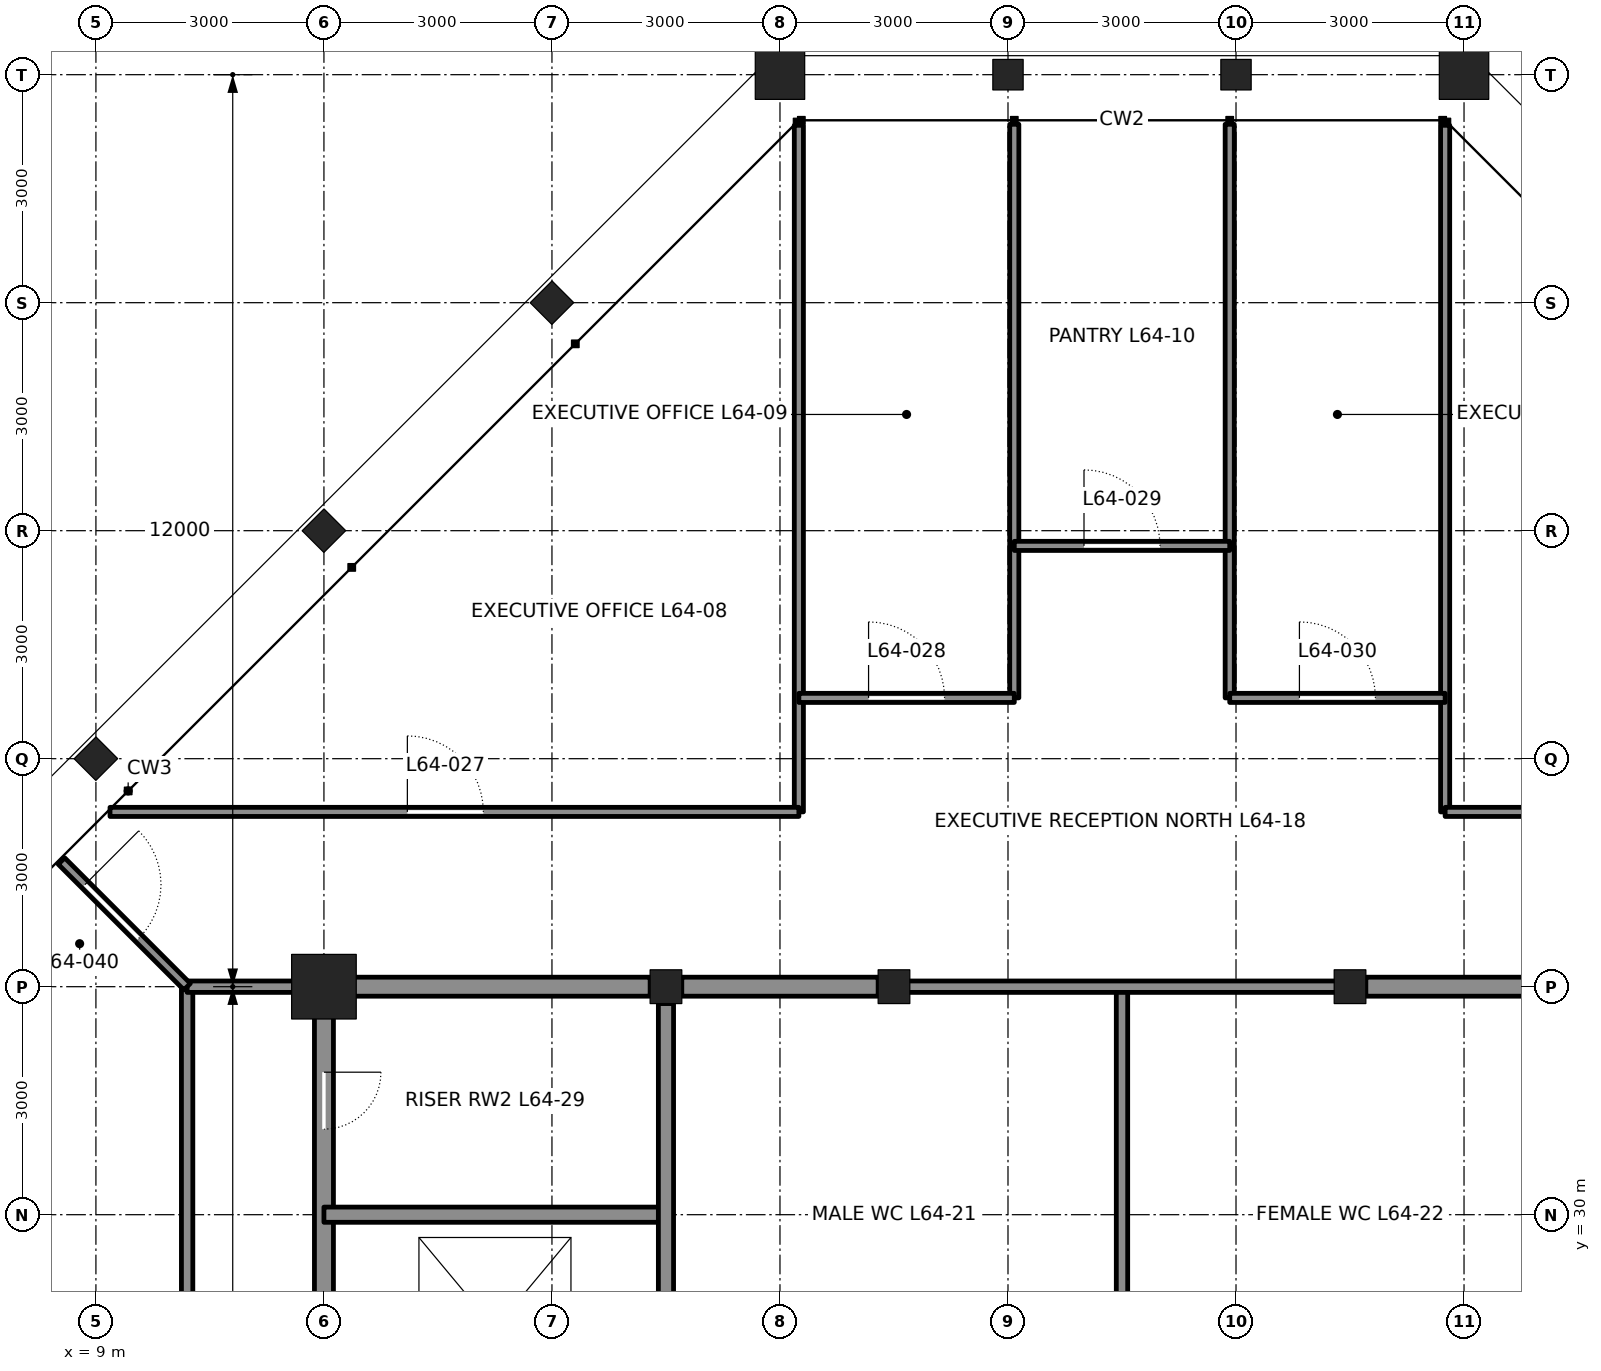
"""IFC4 building model, lengths in metres.
Left out: names, types, materials, properties, quantities, classifications, styles, units other than length and angle.
Written with IfcOpenShell. Run it as: python <this file> out.ifc"""

import sys

from ifc_helpers import new_model, si_unit, direction, frame, frame_2d, origin, origin_2d, place, context, subcontext, project, spatial, rectangle, hollow_rectangle, i_section, extrude, element, fill, save


model = new_model("IFC4")
c1 = context("Model", 3, precision=1e-05, world=origin(), true_north=direction((0.0, 1.0)))
c2 = subcontext(c1, "Body", "Model", "MODEL_VIEW")
j1 = project(units=[si_unit("LENGTHUNIT", "METRE"), si_unit("PLANEANGLEUNIT", "RADIAN")], contexts=[c1])
p1 = place(None, origin())
s1 = spatial("IfcSite", under=j1, at=p1, CompositionType="ELEMENT")
p2 = place(p1, origin())
s2 = spatial("IfcBuilding", under=s1, at=p2, CompositionType="ELEMENT")
p3 = place(p2, frame((0.0, 0.0, 287.4)))
s3 = spatial("IfcBuildingStorey", under=s2, at=p3, CompositionType="ELEMENT", Elevation=287.4)
p4 = place(p3, frame((27.0, 45.0, 0.0), z_axis=(0.0, 0.0, 1.0), x_axis=(0.0, 1.0, 0.0)))
e1 = element("IfcColumn", 1, at=p4, inside=s3, PredefinedType="COLUMN", context=c2, shape_type="SweptSolid", body=[
    extrude(hollow_rectangle(XDim=0.65, YDim=0.65, WallThickness=0.065, at=origin_2d()), origin(), (0.0, 0.0, 1.0), 4.2),
])
for number, where, z_axis, x_axis in (
    (2, (24.0, 45.0, 0.0), (0.0, 0.0, 1.0), (0.0, 1.0, 0.0)),
    (3, (21.0, 45.0, 0.0), (0.0, 0.0, 1.0), (0.0, 1.0, 0.0)),
):
    element("IfcColumn", number, at=place(p3, frame(where, z_axis=z_axis, x_axis=x_axis)), inside=s3, PredefinedType="COLUMN", context=c2, shape_type="SweptSolid", body=[
        extrude(i_section(OverallWidth=0.401, OverallDepth=0.399, WebThickness=0.025, FlangeThickness=0.04, at=origin_2d()), origin(), (0.0, 0.0, 1.0), 4.2),
    ])
p5 = place(p3, frame((18.0, 45.0, 0.0), z_axis=(0.0, 0.0, 1.0), x_axis=(0.0, 1.0, 0.0)))
e4 = element("IfcColumn", 4, at=p5, inside=s3, PredefinedType="COLUMN", context=c2, shape_type="SweptSolid", body=[
    extrude(hollow_rectangle(XDim=0.65, YDim=0.65, WallThickness=0.065, at=origin_2d()), origin(), (0.0, 0.0, 1.0), 4.2),
])
for number, where, z_axis, x_axis in (
    (5, (15.0, 42.0, 0.0), (0.0, 0.0, 1.0), (-0.707, 0.707, 0.0)),
    (6, (12.0, 39.0, 0.0), (0.0, 0.0, 1.0), (-0.707, 0.707, 0.0)),
    (7, (9.0, 36.0, 0.0), (0.0, 0.0, 1.0), (-0.707, 0.707, 0.0)),
):
    element("IfcColumn", number, at=place(p3, frame(where, z_axis=z_axis, x_axis=x_axis)), inside=s3, PredefinedType="COLUMN", context=c2, shape_type="SweptSolid", body=[
        extrude(i_section(OverallWidth=0.404, OverallDepth=0.406, WebThickness=0.027, FlangeThickness=0.044, at=origin_2d()), origin(), (0.0, 0.0, 1.0), 4.2),
    ])
p6 = place(p3, frame((12.0, 33.0, 0.0), z_axis=(0.0, 0.0, 1.0), x_axis=(1.0, 0.0, 0.0)))
e8 = element("IfcColumn", 8, at=p6, inside=s3, PredefinedType="COLUMN", context=c2, shape_type="SweptSolid", body=[
    extrude(hollow_rectangle(XDim=0.85, YDim=0.85, WallThickness=0.085, at=origin_2d()), origin(), (0.0, 0.0, 1.0), 4.2),
])
for number, where, z_axis, x_axis in (
    (9, (16.5, 33.0, 0.0), (0.0, 0.0, 1.0), (1.0, 0.0, 0.0)),
    (10, (19.5, 33.0, 0.0), (0.0, 0.0, 1.0), (1.0, 0.0, 0.0)),
    (11, (25.5, 33.0, 0.0), (0.0, 0.0, 1.0), (1.0, 0.0, 0.0)),
):
    element("IfcColumn", number, at=place(p3, frame(where, z_axis=z_axis, x_axis=x_axis)), inside=s3, PredefinedType="COLUMN", context=c2, shape_type="SweptSolid", body=[
        extrude(i_section(OverallWidth=0.417, OverallDepth=0.445, WebThickness=0.039, FlangeThickness=0.063, at=origin_2d()), origin(), (0.0, 0.0, 1.0), 4.2),
    ])
p7 = place(p3, frame((12.0, 24.222, 0.0), z_axis=(0.0, 0.0, 1.0), x_axis=(0.0, 1.0, 0.0)))
e12 = element("IfcWall", 12, at=p7, inside=s3, PredefinedType="SOLIDWALL", context=c2, shape_type="SweptSolid", body=[
    extrude(rectangle(XDim=8.528, YDim=0.25, at=frame_2d((4.264, 0.0))), origin(), (0.0, 0.0, 1.0), 3.113),
])
p8 = place(p7, frame((0.678, 0.0, 0.0)))
e13 = element("IfcOpeningElement", 13, at=p8, cuts=e12, PredefinedType="OPENING", context=c2, shape_type="SweptSolid", body=[
    extrude(rectangle(XDim=1.2, YDim=2.1, at=frame_2d((0.6, 1.05))), frame((0.0, 0.135, 0.0), z_axis=(0.0, -1.0, 0.0), x_axis=(1.0, 0.0, 0.0)), (0.0, 0.0, 1.0), 0.27),
])
p9 = place(p7, frame((6.903, 0.0, 0.0)))
e14 = element("IfcOpeningElement", 14, at=p9, cuts=e12, PredefinedType="OPENING", context=c2, shape_type="SweptSolid", body=[
    extrude(rectangle(XDim=0.75, YDim=2.1, at=frame_2d((0.375, 1.05))), frame((0.0, 0.135, 0.0), z_axis=(0.0, -1.0, 0.0), x_axis=(1.0, 0.0, 0.0)), (0.0, 0.0, 1.0), 0.27),
])
p10 = place(p3, frame((12.0, 30.0, 0.0), z_axis=(0.0, 0.0, 1.0), x_axis=(1.0, 0.0, 0.0)))
e15 = element("IfcWall", 15, at=p10, inside=s3, PredefinedType="SOLIDWALL", context=c2, shape_type="SweptSolid", body=[
    extrude(rectangle(XDim=4.5, YDim=0.2, at=frame_2d((2.25, 0.0))), origin(), (0.0, 0.0, 1.0), 4.04),
])
p11 = place(p3, frame((12.25, 33.0, 0.0), z_axis=(0.0, 0.0, 1.0), x_axis=(1.0, 0.0, 0.0)))
e16 = element("IfcWall", 16, at=p11, inside=s3, PredefinedType="SOLIDWALL", context=c2, shape_type="SweptSolid", body=[
    extrude(rectangle(XDim=4.042, YDim=0.25, at=frame_2d((2.021, 0.0))), origin(), (0.0, 0.0, 1.0), 3.182),
])
for number, where, z_axis, x_axis in (
    (17, (16.708, 33.0, 0.0), (0.0, 0.0, 1.0), (1.0, 0.0, 0.0)),
    (18, (25.708, 33.0, 0.0), (0.0, 0.0, 1.0), (1.0, 0.0, 0.0)),
):
    element("IfcWall", number, at=place(p3, frame(where, z_axis=z_axis, x_axis=x_axis)), inside=s3, PredefinedType="SOLIDWALL", context=c2, shape_type="SweptSolid", body=[
        extrude(rectangle(XDim=2.583, YDim=0.25, at=frame_2d((1.292, 0.0))), origin(), (0.0, 0.0, 1.0), 3.182),
    ])
p12 = place(p3, frame((16.5, 24.222, 0.0), z_axis=(0.0, 0.0, 1.0), x_axis=(0.0, 1.0, 0.0)))
e19 = element("IfcWall", 19, at=p12, inside=s3, PredefinedType="SOLIDWALL", context=c2, shape_type="SweptSolid", body=[
    extrude(rectangle(XDim=8.555, YDim=0.2, at=frame_2d((4.278, 0.0))), origin(), (0.0, 0.0, 1.0), 3.113),
])
p13 = place(p3, frame((22.5, 27.0, 0.0), z_axis=(0.0, 0.0, 1.0), x_axis=(0.0, 1.0, 0.0)))
e20 = element("IfcWall", 20, at=p13, inside=s3, PredefinedType="PARTITIONING", context=c2, shape_type="SweptSolid", body=[
    extrude(rectangle(XDim=6.0, YDim=0.15, at=frame_2d((3.0, 0.0))), origin(), (0.0, 0.0, 1.0), 4.04),
])
p14 = place(p3, frame((19.5, 33.0, 0.0), z_axis=(0.0, 0.0, 1.0), x_axis=(1.0, 0.0, 0.0)))
e21 = element("IfcWall", 21, at=p14, inside=s3, PredefinedType="PARTITIONING", context=c2, shape_type="SweptSolid", body=[
    extrude(rectangle(XDim=6.0, YDim=0.15, at=frame_2d((3.0, 0.0))), origin(), (0.0, 0.0, 1.0), 3.182),
])
p15 = place(p3, frame((18.249, 44.334, 0.0), z_axis=(0.0, 0.0, 1.0), x_axis=(0.0, -1.0, 0.0)))
e22 = element("IfcWall", 22, at=p15, inside=s3, PredefinedType="PARTITIONING", context=c2, shape_type="SweptSolid", body=[
    extrude(rectangle(XDim=9.034, YDim=0.12, at=frame_2d((4.517, 0.0))), origin(), (0.0, 0.0, 1.0), 4.04),
])
for number, where, z_axis, x_axis in (
    (23, (21.083, 44.347, 0.0), (0.0, 0.0, 1.0), (0.0, -1.0, 0.0)),
    (24, (23.917, 44.347, 0.0), (0.0, 0.0, 1.0), (0.0, -1.0, 0.0)),
):
    element("IfcWall", number, at=place(p3, frame(where, z_axis=z_axis, x_axis=x_axis)), inside=s3, PredefinedType="PARTITIONING", context=c2, shape_type="SweptSolid", body=[
        extrude(rectangle(XDim=7.547, YDim=0.12, at=frame_2d((3.774, 0.0))), origin(), (0.0, 0.0, 1.0), 3.357),
    ])
p16 = place(p3, frame((26.751, 44.334, 0.0), z_axis=(0.0, 0.0, 1.0), x_axis=(0.0, -1.0, 0.0)))
e25 = element("IfcWall", 25, at=p16, inside=s3, PredefinedType="PARTITIONING", context=c2, shape_type="SweptSolid", body=[
    extrude(rectangle(XDim=9.034, YDim=0.12, at=frame_2d((4.517, 0.0))), origin(), (0.0, 0.0, 1.0), 4.04),
])
p17 = place(p3, frame((9.186, 35.3, 0.0), z_axis=(0.0, 0.0, 1.0), x_axis=(1.0, 0.0, 0.0)))
e26 = element("IfcWall", 26, at=p17, inside=s3, PredefinedType="PARTITIONING", context=c2, shape_type="SweptSolid", body=[
    extrude(rectangle(XDim=9.063, YDim=0.12, at=frame_2d((4.531, 0.0))), origin(), (0.0, 0.0, 1.0), 4.04),
])
p18 = place(p17, frame((3.912, 0.0, 0.0)))
e27 = element("IfcOpeningElement", 27, at=p18, cuts=e26, PredefinedType="OPENING", context=c2, shape_type="SweptSolid", body=[
    extrude(rectangle(XDim=1.0, YDim=2.4, at=frame_2d((0.5, 1.2))), frame((0.0, 0.07, 0.0), z_axis=(0.0, -1.0, 0.0), x_axis=(1.0, 0.0, 0.0)), (0.0, 0.0, 1.0), 0.14),
])
p19 = place(p3, frame((18.249, 36.8, 0.0), z_axis=(0.0, 0.0, 1.0), x_axis=(1.0, 0.0, 0.0)))
e28 = element("IfcWall", 28, at=p19, inside=s3, PredefinedType="PARTITIONING", context=c2, shape_type="SweptSolid", body=[
    extrude(rectangle(XDim=2.834, YDim=0.12, at=frame_2d((1.417, 0.0))), origin(), (0.0, 0.0, 1.0), 4.04),
])
p20 = place(p19, frame((0.917, 0.0, 0.0)))
e29 = element("IfcOpeningElement", 29, at=p20, cuts=e28, PredefinedType="OPENING", context=c2, shape_type="SweptSolid", body=[
    extrude(rectangle(XDim=1.0, YDim=2.4, at=frame_2d((0.5, 1.2))), frame((0.0, 0.07, 0.0), z_axis=(0.0, -1.0, 0.0), x_axis=(1.0, 0.0, 0.0)), (0.0, 0.0, 1.0), 0.14),
])
p21 = place(p3, frame((21.083, 38.8, 0.0), z_axis=(0.0, 0.0, 1.0), x_axis=(1.0, 0.0, 0.0)))
e30 = element("IfcWall", 30, at=p21, inside=s3, PredefinedType="PARTITIONING", context=c2, shape_type="SweptSolid", body=[
    extrude(rectangle(XDim=2.834, YDim=0.12, at=frame_2d((1.417, 0.0))), origin(), (0.0, 0.0, 1.0), 4.04),
])
p22 = place(p21, frame((0.917, 0.0, 0.0)))
e31 = element("IfcOpeningElement", 31, at=p22, cuts=e30, PredefinedType="OPENING", context=c2, shape_type="SweptSolid", body=[
    extrude(rectangle(XDim=1.0, YDim=2.4, at=frame_2d((0.5, 1.2))), frame((0.0, 0.07, 0.0), z_axis=(0.0, -1.0, 0.0), x_axis=(1.0, 0.0, 0.0)), (0.0, 0.0, 1.0), 0.14),
])
p23 = place(p3, frame((23.917, 36.8, 0.0), z_axis=(0.0, 0.0, 1.0), x_axis=(1.0, 0.0, 0.0)))
e32 = element("IfcWall", 32, at=p23, inside=s3, PredefinedType="PARTITIONING", context=c2, shape_type="SweptSolid", body=[
    extrude(rectangle(XDim=2.834, YDim=0.12, at=frame_2d((1.417, 0.0))), origin(), (0.0, 0.0, 1.0), 4.04),
])
p24 = place(p23, frame((0.917, 0.0, 0.0)))
e33 = element("IfcOpeningElement", 33, at=p24, cuts=e32, PredefinedType="OPENING", context=c2, shape_type="SweptSolid", body=[
    extrude(rectangle(XDim=1.0, YDim=2.4, at=frame_2d((0.5, 1.2))), frame((0.0, 0.07, 0.0), z_axis=(0.0, -1.0, 0.0), x_axis=(1.0, 0.0, 0.0)), (0.0, 0.0, 1.0), 0.14),
])
p25 = place(p3, frame((26.751, 35.3, 0.0), z_axis=(0.0, 0.0, 1.0), x_axis=(1.0, 0.0, 0.0)))
e34 = element("IfcWall", 34, at=p25, inside=s3, PredefinedType="PARTITIONING", context=c2, shape_type="SweptSolid", body=[
    extrude(rectangle(XDim=9.063, YDim=0.12, at=frame_2d((4.531, 0.0))), origin(), (0.0, 0.0, 1.0), 4.04),
])
p26 = place(p25, frame((3.512, 0.0, 0.0)))
e35 = element("IfcOpeningElement", 35, at=p26, cuts=e34, PredefinedType="OPENING", context=c2, shape_type="SweptSolid", body=[
    extrude(rectangle(XDim=1.8, YDim=2.4, at=frame_2d((0.9, 1.2))), frame((0.0, 0.07, 0.0), z_axis=(0.0, -1.0, 0.0), x_axis=(1.0, 0.0, 0.0)), (0.0, 0.0, 1.0), 0.14),
])
p27 = place(p3, frame((10.2, 8.686, 0.0), z_axis=(0.0, 0.0, 1.0), x_axis=(0.0, 1.0, 0.0)))
e36 = element("IfcWall", 36, at=p27, inside=s3, PredefinedType="PARTITIONING", context=c2, shape_type="SweptSolid", body=[
    extrude(rectangle(XDim=24.314, YDim=0.15, at=frame_2d((12.157, 0.0))), origin(), (0.0, 0.0, 1.0), 4.04),
])
p28 = place(p27, frame((11.5, 0.0, 0.0)))
e37 = element("IfcOpeningElement", 37, at=p28, cuts=e36, PredefinedType="OPENING", context=c2, shape_type="SweptSolid", body=[
    extrude(rectangle(XDim=1.0, YDim=2.4, at=frame_2d((0.5, 1.2))), frame((0.0, 0.085, 0.0), z_axis=(0.0, -1.0, 0.0), x_axis=(1.0, 0.0, 0.0)), (0.0, 0.0, 1.0), 0.17),
])
p29 = place(p3, frame((10.2, 33.0, 0.0), z_axis=(0.0, 0.0, 1.0), x_axis=(1.0, 0.0, 0.0)))
e38 = element("IfcWall", 38, at=p29, inside=s3, PredefinedType="PARTITIONING", context=c2, shape_type="SweptSolid", body=[
    extrude(rectangle(XDim=1.8, YDim=0.15, at=frame_2d((0.9, 0.0))), origin(), (0.0, 0.0, 1.0), 3.271),
])
p30 = place(p3, frame((10.2, 33.0, 0.0), z_axis=(0.0, 0.0, 1.0), x_axis=(-0.707106781187, 0.707106781187, 0.0)))
e39 = element("IfcWall", 39, at=p30, inside=s3, PredefinedType="PARTITIONING", context=c2, shape_type="SweptSolid", body=[
    extrude(rectangle(XDim=2.338, YDim=0.12, at=frame_2d((1.169, 0.0))), origin(), (0.0, 0.0, 1.0), 4.04),
])
p31 = place(p30, frame((0.9, 0.0, 0.0)))
e40 = element("IfcOpeningElement", 40, at=p31, cuts=e39, PredefinedType="OPENING", context=c2, shape_type="SweptSolid", body=[
    extrude(rectangle(XDim=1.0, YDim=2.4, at=frame_2d((0.5, 1.2))), frame((0.0, 0.07, 0.0), z_axis=(0.0, -1.0, 0.0), x_axis=(1.0, 0.0, 0.0)), (0.0, 0.0, 1.0), 0.14),
])
p32 = place(p9, frame((0.75, 0.0, 0.0), z_axis=(0.0, 0.0, 1.0), x_axis=(-1.0, 0.0, 0.0)))
e41 = element("IfcDoor", 41, at=p32, inside=s3, OperationType="SINGLE_SWING_LEFT", PredefinedType="DOOR", context=c2, shape_type="SweptSolid", body=[
    extrude(rectangle(XDim=0.75, YDim=2.1, at=frame_2d((0.375, 1.05))), frame((0.0, 0.025, 0.0), z_axis=(0.0, -1.0, 0.0), x_axis=(1.0, 0.0, 0.0)), (0.0, 0.0, 1.0), 0.05),
])
fill(e14, e41)
p33 = place(p18, origin())
e42 = element("IfcDoor", 42, at=p33, inside=s3, OperationType="SINGLE_SWING_LEFT", PredefinedType="DOOR", context=c2, shape_type="SweptSolid", body=[
    extrude(rectangle(XDim=1.0, YDim=2.4, at=frame_2d((0.5, 1.2))), frame((0.0, 0.025, 0.0), z_axis=(0.0, -1.0, 0.0), x_axis=(1.0, 0.0, 0.0)), (0.0, 0.0, 1.0), 0.05),
])
fill(e27, e42)
p34 = place(p20, origin())
e43 = element("IfcDoor", 43, at=p34, inside=s3, OperationType="SINGLE_SWING_LEFT", PredefinedType="DOOR", context=c2, shape_type="SweptSolid", body=[
    extrude(rectangle(XDim=1.0, YDim=2.4, at=frame_2d((0.5, 1.2))), frame((0.0, 0.025, 0.0), z_axis=(0.0, -1.0, 0.0), x_axis=(1.0, 0.0, 0.0)), (0.0, 0.0, 1.0), 0.05),
])
fill(e29, e43)
p35 = place(p22, origin())
e44 = element("IfcDoor", 44, at=p35, inside=s3, OperationType="SINGLE_SWING_LEFT", PredefinedType="DOOR", context=c2, shape_type="SweptSolid", body=[
    extrude(rectangle(XDim=1.0, YDim=2.4, at=frame_2d((0.5, 1.2))), frame((0.0, 0.025, 0.0), z_axis=(0.0, -1.0, 0.0), x_axis=(1.0, 0.0, 0.0)), (0.0, 0.0, 1.0), 0.05),
])
fill(e31, e44)
p36 = place(p24, origin())
e45 = element("IfcDoor", 45, at=p36, inside=s3, OperationType="SINGLE_SWING_LEFT", PredefinedType="DOOR", context=c2, shape_type="SweptSolid", body=[
    extrude(rectangle(XDim=1.0, YDim=2.4, at=frame_2d((0.5, 1.2))), frame((0.0, 0.025, 0.0), z_axis=(0.0, -1.0, 0.0), x_axis=(1.0, 0.0, 0.0)), (0.0, 0.0, 1.0), 0.05),
])
fill(e33, e45)
p37 = place(p31, frame((1.0, 0.0, 0.0), z_axis=(0.0, 0.0, 1.0), x_axis=(-1.0, 0.0, 0.0)))
e46 = element("IfcDoor", 46, at=p37, inside=s3, OperationType="SINGLE_SWING_LEFT", PredefinedType="DOOR", context=c2, shape_type="SweptSolid", body=[
    extrude(rectangle(XDim=1.0, YDim=2.4, at=frame_2d((0.5, 1.2))), frame((0.0, 0.025, 0.0), z_axis=(0.0, -1.0, 0.0), x_axis=(1.0, 0.0, 0.0)), (0.0, 0.0, 1.0), 0.05),
])
fill(e40, e46)
save(model, sys.argv[1])
